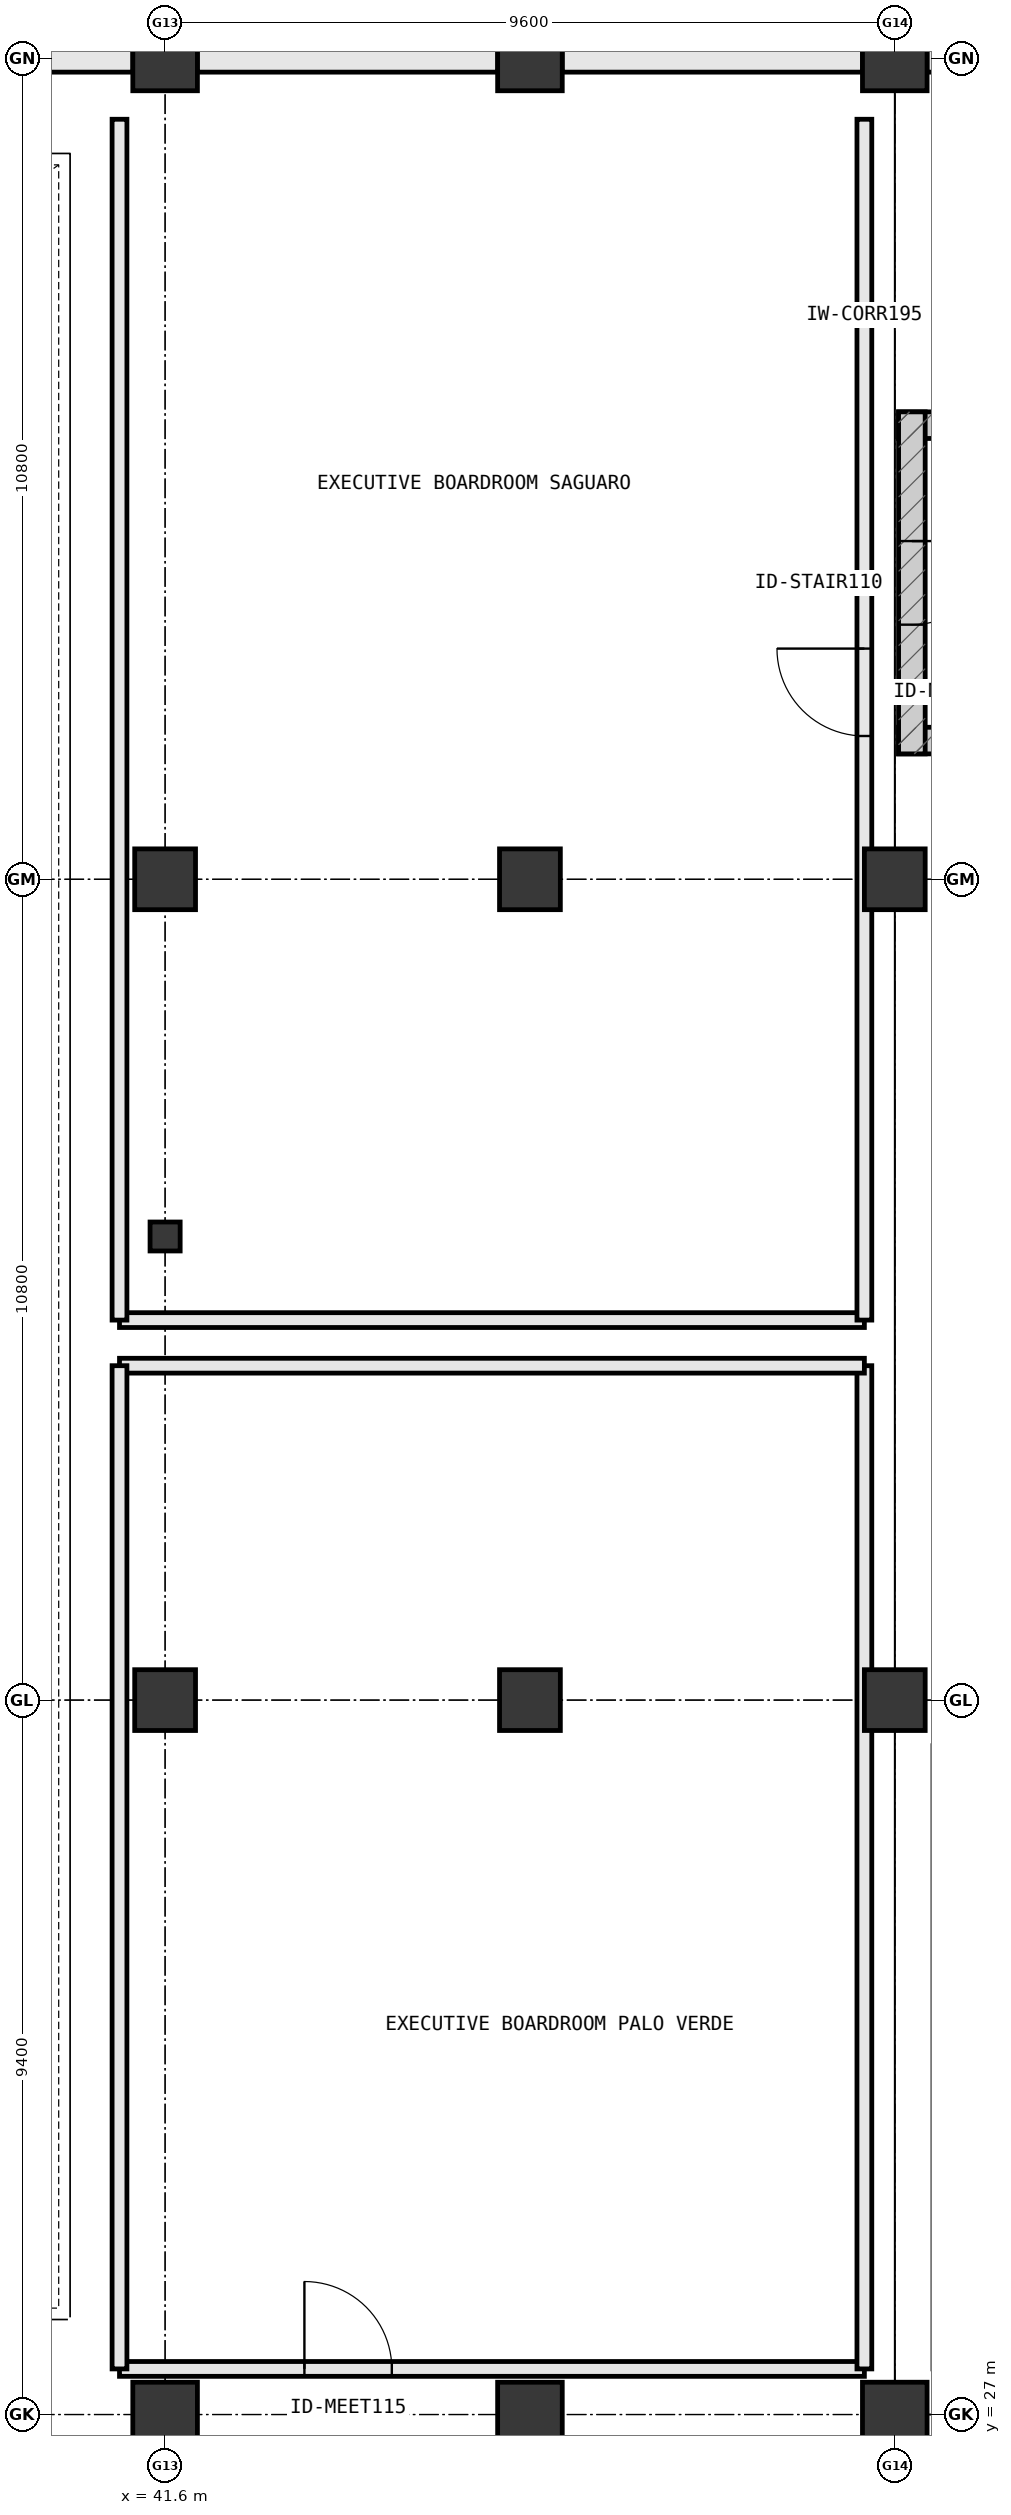
"""IFC4 building model, lengths in metres.
Left out: names, types, materials, properties, quantities, classifications, styles, units other than length and angle.
Written with IfcOpenShell. Run it as: python <this file> out.ifc"""

import sys

from ifc_helpers import new_model, si_unit, direction, frame, frame_2d, origin, origin_2d, place, context, subcontext, project, spatial, rectangle, i_section, extrude, element, fill, save


model = new_model("IFC4")
c1 = context("Model", 3, precision=1e-05, world=origin(), true_north=direction((0.0, 1.0)))
c2 = subcontext(c1, "Body", "Model", "MODEL_VIEW")
j1 = project(units=[si_unit("LENGTHUNIT", "METRE"), si_unit("PLANEANGLEUNIT", "RADIAN")], contexts=[c1])
p1 = place(None, origin())
s1 = spatial("IfcSite", under=j1, at=p1, CompositionType="ELEMENT")
p2 = place(p1, origin())
s2 = spatial("IfcBuilding", under=s1, at=p2, CompositionType="ELEMENT")
p3 = place(p2, frame((0.0, 0.0, 5.4)))
s3 = spatial("IfcBuildingStorey", under=s2, at=p3, CompositionType="ELEMENT", Elevation=5.4)
for number, where, z_axis, x_axis in (
    (1, (41.6, 27.0, 0.0), (0.0, 0.0, 1.0), (1.0, 0.0, 0.0)),
    (2, (41.6, 58.0, 0.0), (0.0, 0.0, 1.0), (1.0, 0.0, 0.0)),
):
    element("IfcColumn", number, at=place(p3, frame(where, z_axis=z_axis, x_axis=x_axis)), inside=s3, PredefinedType="COLUMN", context=c2, shape_type="SweptSolid", body=[
        extrude(rectangle(XDim=0.85, YDim=0.85, at=origin_2d()), origin(), (0.0, 0.0, 1.0), 5.4),
    ])
p4 = place(p3, frame((41.6, 36.4, 0.0), z_axis=(0.0, 0.0, 1.0), x_axis=(1.0, 0.0, 0.0)))
e3 = element("IfcColumn", 3, at=p4, inside=s3, PredefinedType="COLUMN", context=c2, shape_type="SweptSolid", body=[
    extrude(rectangle(XDim=0.8, YDim=0.8, at=origin_2d()), origin(), (0.0, 0.0, 1.0), 5.4),
])
p5 = place(p3, frame((41.6, 42.5, 0.0), z_axis=(0.0, 0.0, 1.0), x_axis=(1.0, 0.0, 0.0)))
e4 = element("IfcColumn", 4, at=p5, inside=s3, PredefinedType="COLUMN", context=c2, shape_type="SweptSolid", body=[
    extrude(i_section(OverallWidth=0.396, OverallDepth=0.381, WebThickness=0.019, FlangeThickness=0.03, at=origin_2d()), origin(), (0.0, 0.0, 1.0), 5.4),
])
p6 = place(p3, frame((41.6, 47.2, 0.0), z_axis=(0.0, 0.0, 1.0), x_axis=(1.0, 0.0, 0.0)))
e5 = element("IfcColumn", 5, at=p6, inside=s3, PredefinedType="COLUMN", context=c2, shape_type="SweptSolid", body=[
    extrude(rectangle(XDim=0.8, YDim=0.8, at=origin_2d()), origin(), (0.0, 0.0, 1.0), 5.4),
])
p7 = place(p3, frame((46.4, 27.0, 0.0), z_axis=(0.0, 0.0, 1.0), x_axis=(1.0, 0.0, 0.0)))
e6 = element("IfcColumn", 6, at=p7, inside=s3, PredefinedType="COLUMN", context=c2, shape_type="SweptSolid", body=[
    extrude(rectangle(XDim=0.85, YDim=0.85, at=origin_2d()), origin(), (0.0, 0.0, 1.0), 5.4),
])
for number, where, z_axis, x_axis in (
    (7, (46.4, 36.4, 0.0), (0.0, 0.0, 1.0), (1.0, 0.0, 0.0)),
    (8, (46.4, 47.2, 0.0), (0.0, 0.0, 1.0), (1.0, 0.0, 0.0)),
):
    element("IfcColumn", number, at=place(p3, frame(where, z_axis=z_axis, x_axis=x_axis)), inside=s3, PredefinedType="COLUMN", context=c2, shape_type="SweptSolid", body=[
        extrude(rectangle(XDim=0.8, YDim=0.8, at=origin_2d()), origin(), (0.0, 0.0, 1.0), 5.4),
    ])
for number, where, z_axis, x_axis in (
    (9, (46.4, 58.0, 0.0), (0.0, 0.0, 1.0), (1.0, 0.0, 0.0)),
    (10, (51.2, 27.0, 0.0), (0.0, 0.0, 1.0), (1.0, 0.0, 0.0)),
):
    element("IfcColumn", number, at=place(p3, frame(where, z_axis=z_axis, x_axis=x_axis)), inside=s3, PredefinedType="COLUMN", context=c2, shape_type="SweptSolid", body=[
        extrude(rectangle(XDim=0.85, YDim=0.85, at=origin_2d()), origin(), (0.0, 0.0, 1.0), 5.4),
    ])
for number, where, z_axis, x_axis in (
    (11, (51.2, 36.4, 0.0), (0.0, 0.0, 1.0), (1.0, 0.0, 0.0)),
    (12, (51.2, 47.2, 0.0), (0.0, 0.0, 1.0), (1.0, 0.0, 0.0)),
):
    element("IfcColumn", number, at=place(p3, frame(where, z_axis=z_axis, x_axis=x_axis)), inside=s3, PredefinedType="COLUMN", context=c2, shape_type="SweptSolid", body=[
        extrude(rectangle(XDim=0.8, YDim=0.8, at=origin_2d()), origin(), (0.0, 0.0, 1.0), 5.4),
    ])
p8 = place(p3, frame((51.2, 58.0, 0.0), z_axis=(0.0, 0.0, 1.0), x_axis=(1.0, 0.0, 0.0)))
e13 = element("IfcColumn", 13, at=p8, inside=s3, PredefinedType="COLUMN", context=c2, shape_type="SweptSolid", body=[
    extrude(rectangle(XDim=0.85, YDim=0.85, at=origin_2d()), origin(), (0.0, 0.0, 1.0), 5.4),
])
for number, where, z_axis, x_axis in (
    (14, (50.777, 58.0, 0.0), (0.0, 0.0, 1.0), (-1.0, 0.0, 0.0)),
    (15, (45.977, 58.0, 0.0), (0.0, 0.0, 1.0), (-1.0, 0.0, 0.0)),
):
    element("IfcWall", number, at=place(p3, frame(where, z_axis=z_axis, x_axis=x_axis)), inside=s3, PredefinedType="STANDARD", context=c2, shape_type="SweptSolid", body=[
        extrude(rectangle(XDim=3.954, YDim=0.36, at=frame_2d((1.977, 0.0))), origin(), (0.0, 0.0, 1.0), 4.513),
    ])
p9 = place(p3, frame((41.177, 58.0, 0.0), z_axis=(0.0, 0.0, 1.0), x_axis=(-1.0, 0.0, 0.0)))
e16 = element("IfcWall", 16, at=p9, inside=s3, PredefinedType="STANDARD", context=c2, shape_type="SweptSolid", body=[
    extrude(rectangle(XDim=10.368, YDim=0.36, at=frame_2d((5.184, 0.0))), origin(), (0.0, 0.0, 1.0), 4.346),
])
p10 = place(p9, frame((1.192, 0.0, 2.5)))
e17 = element("IfcOpeningElement", 17, at=p10, cuts=e16, PredefinedType="OPENING", context=c2, shape_type="SweptSolid", body=[
    extrude(rectangle(XDim=2.8, YDim=1.1, at=frame_2d((1.4, 0.55))), frame((0.0, 0.192, 0.0), z_axis=(0.0, -1.0, 0.0), x_axis=(1.0, 0.0, 0.0)), (0.0, 0.0, 1.0), 0.384),
])
p11 = place(p9, frame((6.376, 0.0, 2.5)))
e18 = element("IfcOpeningElement", 18, at=p11, cuts=e16, PredefinedType="OPENING", context=c2, shape_type="SweptSolid", body=[
    extrude(rectangle(XDim=2.8, YDim=1.1, at=frame_2d((1.4, 0.55))), frame((0.0, 0.192, 0.0), z_axis=(0.0, -1.0, 0.0), x_axis=(1.0, 0.0, 0.0)), (0.0, 0.0, 1.0), 0.384),
])
p12 = place(p3, frame((60.402, 58.0, 0.0), z_axis=(0.0, 0.0, 1.0), x_axis=(-1.0, 0.0, 0.0)))
e19 = element("IfcWall", 19, at=p12, inside=s3, PredefinedType="STANDARD", context=c2, shape_type="SweptSolid", body=[
    extrude(rectangle(XDim=8.779, YDim=0.36, at=frame_2d((4.39, 0.0))), origin(), (0.0, 0.0, 1.0), 4.513),
])
p13 = place(p12, frame((3.29, 0.0, 0.85)))
e20 = element("IfcOpeningElement", 20, at=p13, cuts=e19, PredefinedType="OPENING", context=c2, shape_type="SweptSolid", body=[
    extrude(rectangle(XDim=2.2, YDim=2.0, at=frame_2d((1.1, 1.0))), frame((0.0, 0.192, 0.0), z_axis=(0.0, -1.0, 0.0), x_axis=(1.0, 0.0, 0.0)), (0.0, 0.0, 1.0), 0.384),
])
for number, where, z_axis, x_axis in (
    (21, (51.25, 49.025, 0.0), (0.0, 0.0, 1.0), (1.0, 0.0, 0.0)),
    (22, (63.35, 53.175, 0.0), (0.0, 0.0, 1.0), (-1.0, 0.0, 0.0)),
):
    element("IfcWall", number, at=place(p3, frame(where, z_axis=z_axis, x_axis=x_axis)), inside=s3, PredefinedType="SHEAR", context=c2, shape_type="SweptSolid", body=[
        extrude(rectangle(XDim=12.1, YDim=0.35, at=frame_2d((6.05, 0.0))), origin(), (0.0, 0.0, 1.0), 5.4),
    ])
p14 = place(p3, frame((51.425, 53.35, 0.0), z_axis=(0.0, 0.0, 1.0), x_axis=(0.0, -1.0, 0.0)))
e23 = element("IfcWall", 23, at=p14, inside=s3, PredefinedType="SHEAR", context=c2, shape_type="SweptSolid", body=[
    extrude(rectangle(XDim=4.5, YDim=0.35, at=frame_2d((2.25, 0.0))), origin(), (0.0, 0.0, 1.0), 5.4),
])
p15 = place(p14, frame((1.7, 0.0, 0.0)))
e24 = element("IfcOpeningElement", 24, at=p15, cuts=e23, PredefinedType="OPENING", context=c2, shape_type="SweptSolid", body=[
    extrude(rectangle(XDim=1.1, YDim=2.2, at=frame_2d((0.55, 1.1))), frame((0.0, 0.187, 0.0), z_axis=(0.0, -1.0, 0.0), x_axis=(1.0, 0.0, 0.0)), (0.0, 0.0, 1.0), 0.374),
])
p16 = place(p3, frame((41.0, 27.6, 0.0), z_axis=(0.0, 0.0, 1.0), x_axis=(1.0, 0.0, 0.0)))
e25 = element("IfcWall", 25, at=p16, inside=s3, PredefinedType="PARTITIONING", context=c2, shape_type="SweptSolid", body=[
    extrude(rectangle(XDim=9.8, YDim=0.195, at=frame_2d((4.9, 0.0))), origin(), (0.0, 0.0, 1.0), 5.13),
])
p17 = place(p16, frame((2.433, 0.0, 0.0)))
e26 = element("IfcOpeningElement", 26, at=p17, cuts=e25, PredefinedType="OPENING", context=c2, shape_type="SweptSolid", body=[
    extrude(rectangle(XDim=1.15, YDim=2.2, at=frame_2d((0.575, 1.1))), frame((0.0, 0.11, 0.0), z_axis=(0.0, -1.0, 0.0), x_axis=(1.0, 0.0, 0.0)), (0.0, 0.0, 1.0), 0.219),
])
p18 = place(p3, frame((50.8, 27.6, 0.0), z_axis=(0.0, 0.0, 1.0), x_axis=(0.0, 1.0, 0.0)))
e27 = element("IfcWall", 27, at=p18, inside=s3, PredefinedType="PARTITIONING", context=c2, shape_type="SweptSolid", body=[
    extrude(rectangle(XDim=13.2, YDim=0.195, at=frame_2d((6.6, 0.0))), origin(), (0.0, 0.0, 1.0), 4.485),
])
p19 = place(p3, frame((50.8, 40.8, 0.0), z_axis=(0.0, 0.0, 1.0), x_axis=(-1.0, 0.0, 0.0)))
e28 = element("IfcWall", 28, at=p19, inside=s3, PredefinedType="PARTITIONING", context=c2, shape_type="SweptSolid", body=[
    extrude(rectangle(XDim=9.8, YDim=0.195, at=frame_2d((4.9, 0.0))), origin(), (0.0, 0.0, 1.0), 5.13),
])
p20 = place(p3, frame((41.0, 40.8, 0.0), z_axis=(0.0, 0.0, 1.0), x_axis=(0.0, -1.0, 0.0)))
e29 = element("IfcWall", 29, at=p20, inside=s3, PredefinedType="PARTITIONING", context=c2, shape_type="SweptSolid", body=[
    extrude(rectangle(XDim=13.2, YDim=0.195, at=frame_2d((6.6, 0.0))), origin(), (0.0, 0.0, 1.0), 5.13),
])
p21 = place(p3, frame((41.0, 41.4, 0.0), z_axis=(0.0, 0.0, 1.0), x_axis=(1.0, 0.0, 0.0)))
e30 = element("IfcWall", 30, at=p21, inside=s3, PredefinedType="PARTITIONING", context=c2, shape_type="SweptSolid", body=[
    extrude(rectangle(XDim=9.8, YDim=0.195, at=frame_2d((4.9, 0.0))), origin(), (0.0, 0.0, 1.0), 5.13),
])
p22 = place(p3, frame((50.8, 41.4, 0.0), z_axis=(0.0, 0.0, 1.0), x_axis=(0.0, 1.0, 0.0)))
e31 = element("IfcWall", 31, at=p22, inside=s3, PredefinedType="PARTITIONING", context=c2, shape_type="SweptSolid", body=[
    extrude(rectangle(XDim=15.8, YDim=0.195, at=frame_2d((7.9, 0.0))), origin(), (0.0, 0.0, 1.0), 4.485),
])
p23 = place(p22, frame((7.685, 0.0, 0.0)))
e32 = element("IfcOpeningElement", 32, at=p23, cuts=e31, PredefinedType="OPENING", context=c2, shape_type="SweptSolid", body=[
    extrude(rectangle(XDim=1.15, YDim=2.2, at=frame_2d((0.575, 1.1))), frame((0.0, 0.11, 0.0), z_axis=(0.0, -1.0, 0.0), x_axis=(1.0, 0.0, 0.0)), (0.0, 0.0, 1.0), 0.219),
])
p24 = place(p3, frame((41.0, 57.2, 0.0), z_axis=(0.0, 0.0, 1.0), x_axis=(0.0, -1.0, 0.0)))
e33 = element("IfcWall", 33, at=p24, inside=s3, PredefinedType="PARTITIONING", context=c2, shape_type="SweptSolid", body=[
    extrude(rectangle(XDim=15.8, YDim=0.195, at=frame_2d((7.9, 0.0))), origin(), (0.0, 0.0, 1.0), 5.13),
])
p25 = place(p15, origin())
e34 = element("IfcDoor", 34, at=p25, inside=s3, OperationType="SINGLE_SWING_LEFT", PredefinedType="DOOR", context=c2, shape_type="SweptSolid", body=[
    extrude(rectangle(XDim=1.1, YDim=2.2, at=frame_2d((0.55, 1.1))), frame((0.0, 0.025, 0.0), z_axis=(0.0, -1.0, 0.0), x_axis=(1.0, 0.0, 0.0)), (0.0, 0.0, 1.0), 0.05),
])
fill(e24, e34)
p26 = place(p17, origin())
e35 = element("IfcDoor", 35, at=p26, inside=s3, OperationType="SINGLE_SWING_LEFT", PredefinedType="DOOR", context=c2, shape_type="SweptSolid", body=[
    extrude(rectangle(XDim=1.15, YDim=2.2, at=frame_2d((0.575, 1.1))), frame((0.0, 0.025, 0.0), z_axis=(0.0, -1.0, 0.0), x_axis=(1.0, 0.0, 0.0)), (0.0, 0.0, 1.0), 0.05),
])
fill(e26, e35)
p27 = place(p23, origin())
e36 = element("IfcDoor", 36, at=p27, inside=s3, OperationType="SINGLE_SWING_RIGHT", PredefinedType="DOOR", context=c2, shape_type="SweptSolid", body=[
    extrude(rectangle(XDim=1.15, YDim=2.2, at=frame_2d((0.575, 1.1))), frame((0.0, 0.025, 0.0), z_axis=(0.0, -1.0, 0.0), x_axis=(1.0, 0.0, 0.0)), (0.0, 0.0, 1.0), 0.05),
])
fill(e32, e36)
save(model, sys.argv[1])
